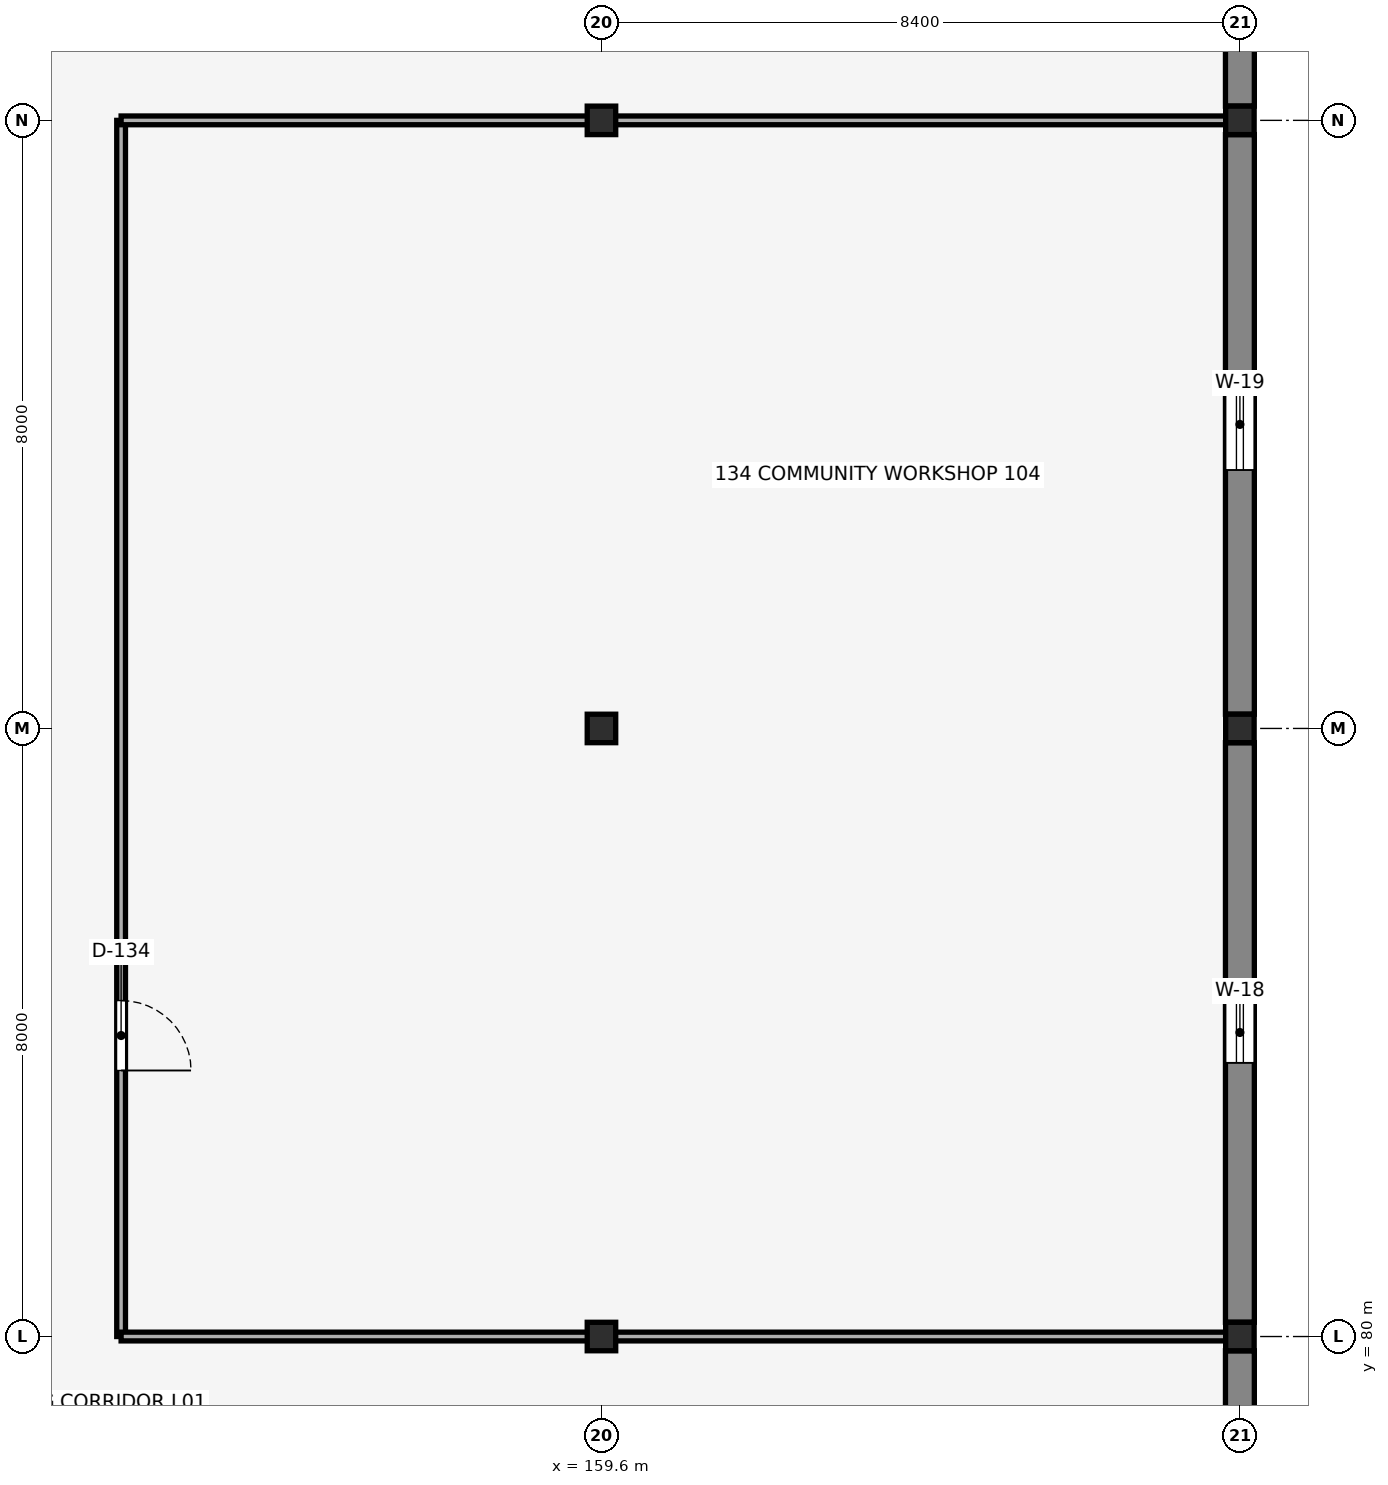
"""IFC4 building model, lengths in metres.
Left out: names, types, materials, properties, quantities, classifications, styles, units other than length and angle.
Written with IfcOpenShell. Run it as: python <this file> out.ifc"""

import sys

from ifc_helpers import new_model, si_unit, direction, frame, frame_2d, origin, origin_2d, place, context, subcontext, project, spatial, rectangle, i_section, extrude, element, fill, save


model = new_model("IFC4")
c1 = context("Model", 3, precision=1e-05, world=origin(), true_north=direction((0.0, 1.0)))
c2 = subcontext(c1, "Body", "Model", "MODEL_VIEW")
j1 = project(units=[si_unit("LENGTHUNIT", "METRE"), si_unit("PLANEANGLEUNIT", "RADIAN")], contexts=[c1])
p1 = place(None, origin())
s1 = spatial("IfcSite", under=j1, at=p1, CompositionType="ELEMENT")
p2 = place(p1, origin())
s2 = spatial("IfcBuilding", under=s1, at=p2, CompositionType="ELEMENT")
p3 = place(p2, frame((0.0, 0.0, 5.44)))
s3 = spatial("IfcBuildingStorey", under=s2, at=p3, CompositionType="ELEMENT", Elevation=5.44)
for number, where, z_axis, x_axis in (
    (1, (159.6, 80.0, 0.0), (0.0, 0.0, 1.0), (1.0, 0.0, 0.0)),
    (2, (159.6, 88.0, 0.0), (0.0, 0.0, 1.0), (1.0, 0.0, 0.0)),
    (3, (159.6, 96.0, 0.0), (0.0, 0.0, 1.0), (1.0, 0.0, 0.0)),
    (4, (168.0, 80.0, 0.0), (0.0, 0.0, 1.0), (1.0, 0.0, 0.0)),
    (5, (168.0, 88.0, 0.0), (0.0, 0.0, 1.0), (1.0, 0.0, 0.0)),
    (6, (168.0, 96.0, 0.0), (0.0, 0.0, 1.0), (1.0, 0.0, 0.0)),
):
    element("IfcColumn", number, at=place(p3, frame(where, z_axis=z_axis, x_axis=x_axis)), inside=s3, PredefinedType="COLUMN", context=c2, shape_type="SweptSolid", body=[
        extrude(i_section(OverallWidth=0.375, OverallDepth=0.375, WebThickness=0.017, FlangeThickness=0.027, FilletRadius=0.015, at=origin_2d()), origin(), (0.0, 0.0, 1.0), 3.8),
    ])
p4 = place(p3, frame((168.0, 96.187, 0.0), z_axis=(0.0, 0.0, 1.0), x_axis=(0.0, 1.0, 0.0)))
e7 = element("IfcWall", 7, at=p4, inside=s3, PredefinedType="SOLIDWALL", context=c2, shape_type="SweptSolid", body=[
    extrude(rectangle(XDim=7.625, YDim=0.38, at=frame_2d((3.813, 0.0))), origin(), (0.0, 0.0, 1.0), 3.442),
])
p5 = place(p4, frame((2.213, 0.0, 1.55), z_axis=(0.0, 0.0, 1.0), x_axis=(1.0, 0.0, 0.0)))
e8 = element("IfcOpeningElement", 8, at=p5, cuts=e7, PredefinedType="OPENING", context=c2, shape_type="SweptSolid", body=[
    extrude(rectangle(XDim=3.2, YDim=0.9, at=frame_2d((1.6, 0.45))), frame((0.0, 0.2, 0.0), z_axis=(0.0, -1.0, 0.0), x_axis=(1.0, 0.0, 0.0)), (0.0, 0.0, 1.0), 0.4),
])
p6 = place(p3, frame((168.0, 72.187, 0.0), z_axis=(0.0, 0.0, 1.0), x_axis=(0.0, 1.0, 0.0)))
e9 = element("IfcWall", 9, at=p6, inside=s3, PredefinedType="SOLIDWALL", context=c2, shape_type="SweptSolid", body=[
    extrude(rectangle(XDim=7.625, YDim=0.38, at=frame_2d((3.813, 0.0))), origin(), (0.0, 0.0, 1.0), 3.5),
])
p7 = place(p3, frame((168.0, 80.187, 0.0), z_axis=(0.0, 0.0, 1.0), x_axis=(0.0, 1.0, 0.0)))
e10 = element("IfcWall", 10, at=p7, inside=s3, PredefinedType="SOLIDWALL", context=c2, shape_type="SweptSolid", body=[
    extrude(rectangle(XDim=7.625, YDim=0.38, at=frame_2d((3.813, 0.0))), origin(), (0.0, 0.0, 1.0), 3.442),
])
p8 = place(p7, frame((3.413, 0.0, 0.65), z_axis=(0.0, 0.0, 1.0), x_axis=(1.0, 0.0, 0.0)))
e11 = element("IfcOpeningElement", 11, at=p8, cuts=e10, PredefinedType="OPENING", context=c2, shape_type="SweptSolid", body=[
    extrude(rectangle(XDim=0.8, YDim=1.85, at=frame_2d((0.4, 0.925))), frame((0.0, 0.2, 0.0), z_axis=(0.0, -1.0, 0.0), x_axis=(1.0, 0.0, 0.0)), (0.0, 0.0, 1.0), 0.4),
])
p9 = place(p3, frame((168.0, 88.187, 0.0), z_axis=(0.0, 0.0, 1.0), x_axis=(0.0, 1.0, 0.0)))
e12 = element("IfcWall", 12, at=p9, inside=s3, PredefinedType="SOLIDWALL", context=c2, shape_type="SweptSolid", body=[
    extrude(rectangle(XDim=7.625, YDim=0.38, at=frame_2d((3.813, 0.0))), origin(), (0.0, 0.0, 1.0), 3.442),
])
p10 = place(p9, frame((3.213, 0.0, 1.55), z_axis=(0.0, 0.0, 1.0), x_axis=(1.0, 0.0, 0.0)))
e13 = element("IfcOpeningElement", 13, at=p10, cuts=e12, PredefinedType="OPENING", context=c2, shape_type="SweptSolid", body=[
    extrude(rectangle(XDim=1.2, YDim=0.95, at=frame_2d((0.6, 0.475))), frame((0.0, 0.2, 0.0), z_axis=(0.0, -1.0, 0.0), x_axis=(1.0, 0.0, 0.0)), (0.0, 0.0, 1.0), 0.4),
])
p11 = place(p3, frame((153.28, 80.0, 0.0), z_axis=(0.0, 0.0, 1.0), x_axis=(0.0, 1.0, 0.0)))
e14 = element("IfcWall", 14, at=p11, inside=s3, PredefinedType="PARTITIONING", context=c2, shape_type="SweptSolid", body=[
    extrude(rectangle(XDim=16.0, YDim=0.115, at=frame_2d((8.0, 0.0))), origin(), (0.0, 0.0, 1.0), 3.8),
])
p12 = place(p11, frame((4.42, 0.0, 0.0), z_axis=(0.0, 0.0, 1.0), x_axis=(-1.0, 0.0, 0.0)))
e15 = element("IfcOpeningElement", 15, at=p12, cuts=e14, PredefinedType="OPENING", context=c2, shape_type="SweptSolid", body=[
    extrude(rectangle(XDim=0.92, YDim=2.12, at=frame_2d((0.46, 1.06))), frame((0.0, 0.067, 0.0), z_axis=(0.0, -1.0, 0.0), x_axis=(1.0, 0.0, 0.0)), (0.0, 0.0, 1.0), 0.135),
])
p13 = place(p3, frame((153.28, 80.0, 0.0), z_axis=(0.0, 0.0, 1.0), x_axis=(1.0, 0.0, 0.0)))
e16 = element("IfcWall", 16, at=p13, inside=s3, PredefinedType="PARTITIONING", context=c2, shape_type="SweptSolid", body=[
    extrude(rectangle(XDim=6.143, YDim=0.115, at=frame_2d((3.071, 0.0))), origin(), (0.0, 0.0, 1.0), 3.26),
])
p14 = place(p3, frame((159.777, 80.0, 0.0), z_axis=(0.0, 0.0, 1.0), x_axis=(1.0, 0.0, 0.0)))
e17 = element("IfcWall", 17, at=p14, inside=s3, PredefinedType="PARTITIONING", context=c2, shape_type="SweptSolid", body=[
    extrude(rectangle(XDim=8.045, YDim=0.115, at=frame_2d((4.023, 0.0))), origin(), (0.0, 0.0, 1.0), 3.26),
])
p15 = place(p3, frame((153.28, 96.0, 0.0), z_axis=(0.0, 0.0, 1.0), x_axis=(1.0, 0.0, 0.0)))
e18 = element("IfcWall", 18, at=p15, inside=s3, PredefinedType="PARTITIONING", context=c2, shape_type="SweptSolid", body=[
    extrude(rectangle(XDim=6.143, YDim=0.115, at=frame_2d((3.071, 0.0))), origin(), (0.0, 0.0, 1.0), 3.26),
])
p16 = place(p3, frame((159.777, 96.0, 0.0), z_axis=(0.0, 0.0, 1.0), x_axis=(1.0, 0.0, 0.0)))
e19 = element("IfcWall", 19, at=p16, inside=s3, PredefinedType="PARTITIONING", context=c2, shape_type="SweptSolid", body=[
    extrude(rectangle(XDim=8.045, YDim=0.115, at=frame_2d((4.023, 0.0))), origin(), (0.0, 0.0, 1.0), 3.26),
])
p17 = place(p8, origin())
e20 = element("IfcWindow", 20, at=p17, inside=s3, PartitioningType="SINGLE_PANEL", PredefinedType="WINDOW", context=c2, shape_type="SweptSolid", body=[
    extrude(rectangle(XDim=0.8, YDim=1.85, at=frame_2d((0.4, 0.925))), frame((0.0, 0.03, 0.0), z_axis=(0.0, -1.0, 0.0), x_axis=(1.0, 0.0, 0.0)), (0.0, 0.0, 1.0), 0.06),
])
fill(e11, e20)
p18 = place(p10, origin())
e21 = element("IfcWindow", 21, at=p18, inside=s3, PartitioningType="SINGLE_PANEL", PredefinedType="WINDOW", context=c2, shape_type="SweptSolid", body=[
    extrude(rectangle(XDim=1.2, YDim=0.95, at=frame_2d((0.6, 0.475))), frame((0.0, 0.03, 0.0), z_axis=(0.0, -1.0, 0.0), x_axis=(1.0, 0.0, 0.0)), (0.0, 0.0, 1.0), 0.06),
])
fill(e13, e21)
p19 = place(p12, origin())
e22 = element("IfcDoor", 22, at=p19, inside=s3, OperationType="SINGLE_SWING_RIGHT", PredefinedType="DOOR", context=c2, shape_type="SweptSolid", body=[
    extrude(rectangle(XDim=0.92, YDim=2.12, at=frame_2d((0.46, 1.06))), frame((0.0, 0.025, 0.0), z_axis=(0.0, -1.0, 0.0), x_axis=(1.0, 0.0, 0.0)), (0.0, 0.0, 1.0), 0.05),
])
fill(e15, e22)
save(model, sys.argv[1])
